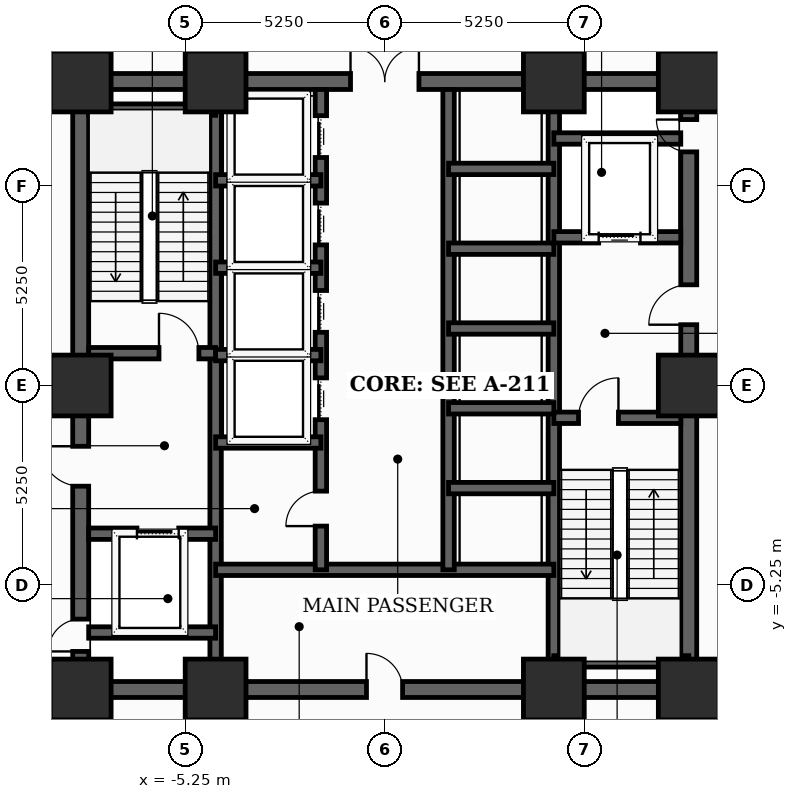
"""IFC4 building model, lengths in metres.
Left out: names, types, materials, properties, quantities, classifications, styles, units other than length and angle.
Written with IfcOpenShell. Run it as: python <this file> out.ifc"""

import sys

from ifc_helpers import new_model, si_unit, direction, frame, frame_2d, origin, origin_2d, place, context, subcontext, project, spatial, rectangle, extrude, element, fill, save


model = new_model("IFC4")
c1 = context("Model", 3, precision=1e-05, world=origin(), true_north=direction((0.0, 1.0)))
c2 = subcontext(c1, "Body", "Model", "MODEL_VIEW")
j1 = project(units=[si_unit("LENGTHUNIT", "METRE"), si_unit("PLANEANGLEUNIT", "RADIAN")], contexts=[c1])
p1 = place(None, origin())
s1 = spatial("IfcSite", under=j1, at=p1, CompositionType="ELEMENT")
p2 = place(p1, origin())
s2 = spatial("IfcBuilding", under=s1, at=p2, CompositionType="ELEMENT")
p3 = place(p2, frame((0.0, 0.0, -4.8)))
s3 = spatial("IfcBuildingStorey", under=s2, at=p3, CompositionType="ELEMENT", Elevation=-4.8)
for number, where, z_axis, x_axis in (
    (1, (-8.0, -8.0, 0.0), (0.0, 0.0, 1.0), (1.0, 0.0, 0.0)),
    (2, (-4.45, -8.0, 0.0), (0.0, 0.0, 1.0), (1.0, 0.0, 0.0)),
    (3, (4.45, -8.0, 0.0), (0.0, 0.0, 1.0), (1.0, 0.0, 0.0)),
    (4, (8.0, -8.0, 0.0), (0.0, 0.0, 1.0), (1.0, 0.0, 0.0)),
    (5, (8.0, 0.0, 0.0), (0.0, 0.0, 1.0), (1.0, 0.0, 0.0)),
    (6, (8.0, 8.0, 0.0), (0.0, 0.0, 1.0), (1.0, 0.0, 0.0)),
    (7, (4.45, 8.0, 0.0), (0.0, 0.0, 1.0), (1.0, 0.0, 0.0)),
    (8, (-4.45, 8.0, 0.0), (0.0, 0.0, 1.0), (1.0, 0.0, 0.0)),
    (9, (-8.0, 8.0, 0.0), (0.0, 0.0, 1.0), (1.0, 0.0, 0.0)),
    (10, (-8.0, 0.0, 0.0), (0.0, 0.0, 1.0), (1.0, 0.0, 0.0)),
):
    element("IfcColumn", number, at=place(p3, frame(where, z_axis=z_axis, x_axis=x_axis)), inside=s3, PredefinedType="COLUMN", context=c2, shape_type="SweptSolid", body=[
        extrude(rectangle(XDim=1.6, YDim=1.6, at=origin_2d()), origin(), (0.0, 0.0, 1.0), 4.8),
    ])
p4 = place(p3, frame((-8.0, -8.0, 0.0), z_axis=(0.0, 0.0, 1.0), x_axis=(0.0, 1.0, 0.0)))
e11 = element("IfcWall", 11, at=p4, inside=s3, PredefinedType="SHEAR", context=c2, shape_type="SweptSolid", body=[
    extrude(rectangle(XDim=16.0, YDim=0.42, at=frame_2d((8.0, 0.0))), origin(), (0.0, 0.0, 1.0), 4.55),
])
p5 = place(p4, frame((1.002, 0.0, 0.0)))
e12 = element("IfcOpeningElement", 12, at=p5, cuts=e11, PredefinedType="OPENING", context=c2, shape_type="SweptSolid", body=[
    extrude(rectangle(XDim=0.85, YDim=2.02, at=frame_2d((0.425, 1.01))), frame((0.0, 0.22, 0.0), z_axis=(0.0, -1.0, 0.0), x_axis=(1.0, 0.0, 0.0)), (0.0, 0.0, 1.0), 0.44),
])
p6 = place(p4, frame((5.35, 0.0, 0.0)))
e13 = element("IfcOpeningElement", 13, at=p6, cuts=e11, PredefinedType="OPENING", context=c2, shape_type="SweptSolid", body=[
    extrude(rectangle(XDim=1.05, YDim=2.15, at=frame_2d((0.525, 1.075))), frame((0.0, 0.22, 0.0), z_axis=(0.0, -1.0, 0.0), x_axis=(1.0, 0.0, 0.0)), (0.0, 0.0, 1.0), 0.44),
])
p7 = place(p3, frame((8.0, -8.0, 0.0), z_axis=(0.0, 0.0, 1.0), x_axis=(0.0, 1.0, 0.0)))
e14 = element("IfcWall", 14, at=p7, inside=s3, PredefinedType="SHEAR", context=c2, shape_type="SweptSolid", body=[
    extrude(rectangle(XDim=16.0, YDim=0.42, at=frame_2d((8.0, 0.0))), origin(), (0.0, 0.0, 1.0), 4.55),
])
p8 = place(p7, frame((9.6, 0.0, 0.0)))
e15 = element("IfcOpeningElement", 15, at=p8, cuts=e14, PredefinedType="OPENING", context=c2, shape_type="SweptSolid", body=[
    extrude(rectangle(XDim=1.05, YDim=2.15, at=frame_2d((0.525, 1.075))), frame((0.0, 0.22, 0.0), z_axis=(0.0, -1.0, 0.0), x_axis=(1.0, 0.0, 0.0)), (0.0, 0.0, 1.0), 0.44),
])
p9 = place(p7, frame((14.148, 0.0, 0.0)))
e16 = element("IfcOpeningElement", 16, at=p9, cuts=e14, PredefinedType="OPENING", context=c2, shape_type="SweptSolid", body=[
    extrude(rectangle(XDim=0.85, YDim=2.02, at=frame_2d((0.425, 1.01))), frame((0.0, 0.22, 0.0), z_axis=(0.0, -1.0, 0.0), x_axis=(1.0, 0.0, 0.0)), (0.0, 0.0, 1.0), 0.44),
])
p10 = place(p3, frame((-8.0, -8.0, 0.0), z_axis=(0.0, 0.0, 1.0), x_axis=(1.0, 0.0, 0.0)))
e17 = element("IfcWall", 17, at=p10, inside=s3, PredefinedType="SHEAR", context=c2, shape_type="SweptSolid", body=[
    extrude(rectangle(XDim=16.0, YDim=0.42, at=frame_2d((8.0, 0.0))), origin(), (0.0, 0.0, 1.0), 4.55),
])
p11 = place(p10, frame((7.52, 0.0, 0.0)))
e18 = element("IfcOpeningElement", 18, at=p11, cuts=e17, PredefinedType="OPENING", context=c2, shape_type="SweptSolid", body=[
    extrude(rectangle(XDim=0.95, YDim=2.1, at=frame_2d((0.475, 1.05))), frame((0.0, 0.22, 0.0), z_axis=(0.0, -1.0, 0.0), x_axis=(1.0, 0.0, 0.0)), (0.0, 0.0, 1.0), 0.44),
])
p12 = place(p3, frame((-8.0, 8.0, 0.0), z_axis=(0.0, 0.0, 1.0), x_axis=(1.0, 0.0, 0.0)))
e19 = element("IfcWall", 19, at=p12, inside=s3, PredefinedType="SHEAR", context=c2, shape_type="SweptSolid", body=[
    extrude(rectangle(XDim=16.0, YDim=0.42, at=frame_2d((8.0, 0.0))), origin(), (0.0, 0.0, 1.0), 4.55),
])
p13 = place(p12, frame((7.1, 0.0, 0.0)))
e20 = element("IfcOpeningElement", 20, at=p13, cuts=e19, PredefinedType="OPENING", context=c2, shape_type="SweptSolid", body=[
    extrude(rectangle(XDim=1.8, YDim=2.15, at=frame_2d((0.9, 1.075))), frame((0.0, 0.22, 0.0), z_axis=(0.0, -1.0, 0.0), x_axis=(1.0, 0.0, 0.0)), (0.0, 0.0, 1.0), 0.44),
])
for number, where, z_axis, x_axis in (
    (21, (-4.45, -7.79, 0.0), (0.0, 0.0, 1.0), (0.0, 1.0, 0.0)),
    (22, (4.45, -7.79, 0.0), (0.0, 0.0, 1.0), (0.0, 1.0, 0.0)),
):
    element("IfcWall", number, at=place(p3, frame(where, z_axis=z_axis, x_axis=x_axis)), inside=s3, PredefinedType="SHEAR", context=c2, shape_type="SweptSolid", body=[
        extrude(rectangle(XDim=15.58, YDim=0.3, at=frame_2d((7.79, 0.0))), origin(), (0.0, 0.0, 1.0), 4.55),
    ])
p14 = place(p3, frame((-7.79, 0.85, 0.0), z_axis=(0.0, 0.0, 1.0), x_axis=(1.0, 0.0, 0.0)))
e23 = element("IfcWall", 23, at=p14, inside=s3, PredefinedType="SHEAR", context=c2, shape_type="SweptSolid", body=[
    extrude(rectangle(XDim=3.34, YDim=0.3, at=frame_2d((1.67, 0.0))), origin(), (0.0, 0.0, 1.0), 4.55),
])
p15 = place(p14, frame((1.85, 0.0, 0.0)))
e24 = element("IfcOpeningElement", 24, at=p15, cuts=e23, PredefinedType="OPENING", context=c2, shape_type="SweptSolid", body=[
    extrude(rectangle(XDim=1.05, YDim=2.15, at=frame_2d((0.525, 1.075))), frame((0.0, 0.16, 0.0), z_axis=(0.0, -1.0, 0.0), x_axis=(1.0, 0.0, 0.0)), (0.0, 0.0, 1.0), 0.32),
])
p16 = place(p3, frame((-7.79, 7.26, 0.0), z_axis=(0.0, 0.0, 1.0), x_axis=(1.0, 0.0, 0.0)))
e25 = element("IfcWall", 25, at=p16, inside=s3, PredefinedType="SHEAR", context=c2, shape_type="SweptSolid", body=[
    extrude(rectangle(XDim=3.34, YDim=0.3, at=frame_2d((1.67, 0.0))), origin(), (0.0, 0.0, 1.0), 4.55),
])
p17 = place(p3, frame((4.45, -0.85, 0.0), z_axis=(0.0, 0.0, 1.0), x_axis=(1.0, 0.0, 0.0)))
e26 = element("IfcWall", 26, at=p17, inside=s3, PredefinedType="SHEAR", context=c2, shape_type="SweptSolid", body=[
    extrude(rectangle(XDim=3.34, YDim=0.3, at=frame_2d((1.67, 0.0))), origin(), (0.0, 0.0, 1.0), 4.55),
])
p18 = place(p17, frame((0.65, 0.0, 0.0)))
e27 = element("IfcOpeningElement", 27, at=p18, cuts=e26, PredefinedType="OPENING", context=c2, shape_type="SweptSolid", body=[
    extrude(rectangle(XDim=1.05, YDim=2.15, at=frame_2d((0.525, 1.075))), frame((0.0, 0.16, 0.0), z_axis=(0.0, -1.0, 0.0), x_axis=(1.0, 0.0, 0.0)), (0.0, 0.0, 1.0), 0.32),
])
p19 = place(p3, frame((4.45, -7.26, 0.0), z_axis=(0.0, 0.0, 1.0), x_axis=(1.0, 0.0, 0.0)))
e28 = element("IfcWall", 28, at=p19, inside=s3, PredefinedType="SHEAR", context=c2, shape_type="SweptSolid", body=[
    extrude(rectangle(XDim=3.55, YDim=0.3, at=frame_2d((1.775, 0.0))), origin(), (0.0, 0.0, 1.0), 4.55),
])
p20 = place(p3, frame((-7.79, -3.9, 0.0), z_axis=(0.0, 0.0, 1.0), x_axis=(1.0, 0.0, 0.0)))
e29 = element("IfcWall", 29, at=p20, inside=s3, PredefinedType="SHEAR", context=c2, shape_type="SweptSolid", body=[
    extrude(rectangle(XDim=3.34, YDim=0.3, at=frame_2d((1.67, 0.0))), origin(), (0.0, 0.0, 1.0), 4.55),
])
p21 = place(p20, frame((1.27, 0.0, 0.0)))
e30 = element("IfcOpeningElement", 30, at=p21, cuts=e29, PredefinedType="OPENING", context=c2, shape_type="SweptSolid", body=[
    extrude(rectangle(XDim=1.1, YDim=2.1, at=frame_2d((0.55, 1.05))), frame((0.0, 0.16, 0.0), z_axis=(0.0, -1.0, 0.0), x_axis=(1.0, 0.0, 0.0)), (0.0, 0.0, 1.0), 0.32),
])
p22 = place(p3, frame((-7.79, -6.5, 0.0), z_axis=(0.0, 0.0, 1.0), x_axis=(1.0, 0.0, 0.0)))
e31 = element("IfcWall", 31, at=p22, inside=s3, PredefinedType="SHEAR", context=c2, shape_type="SweptSolid", body=[
    extrude(rectangle(XDim=3.34, YDim=0.3, at=frame_2d((1.67, 0.0))), origin(), (0.0, 0.0, 1.0), 4.55),
])
p23 = place(p3, frame((4.45, 3.9, 0.0), z_axis=(0.0, 0.0, 1.0), x_axis=(1.0, 0.0, 0.0)))
e32 = element("IfcWall", 32, at=p23, inside=s3, PredefinedType="SHEAR", context=c2, shape_type="SweptSolid", body=[
    extrude(rectangle(XDim=3.34, YDim=0.3, at=frame_2d((1.67, 0.0))), origin(), (0.0, 0.0, 1.0), 4.55),
])
p24 = place(p23, frame((1.18, 0.0, 0.0)))
e33 = element("IfcOpeningElement", 33, at=p24, cuts=e32, PredefinedType="OPENING", context=c2, shape_type="SweptSolid", body=[
    extrude(rectangle(XDim=1.1, YDim=2.1, at=frame_2d((0.55, 1.05))), frame((0.0, 0.16, 0.0), z_axis=(0.0, -1.0, 0.0), x_axis=(1.0, 0.0, 0.0)), (0.0, 0.0, 1.0), 0.32),
])
p25 = place(p3, frame((4.45, 6.5, 0.0), z_axis=(0.0, 0.0, 1.0), x_axis=(1.0, 0.0, 0.0)))
e34 = element("IfcWall", 34, at=p25, inside=s3, PredefinedType="SHEAR", context=c2, shape_type="SweptSolid", body=[
    extrude(rectangle(XDim=3.34, YDim=0.3, at=frame_2d((1.67, 0.0))), origin(), (0.0, 0.0, 1.0), 4.55),
])
p26 = place(p3, frame((-4.45, -4.85, 0.0), z_axis=(0.0, 0.0, 1.0), x_axis=(1.0, 0.0, 0.0)))
e35 = element("IfcWall", 35, at=p26, inside=s3, PredefinedType="SHEAR", context=c2, shape_type="SweptSolid", body=[
    extrude(rectangle(XDim=8.9, YDim=0.3, at=frame_2d((4.45, 0.0))), origin(), (0.0, 0.0, 1.0), 4.55),
])
p27 = place(p3, frame((-1.68, -4.85, 0.0), z_axis=(0.0, 0.0, 1.0), x_axis=(0.0, 1.0, 0.0)))
e36 = element("IfcWall", 36, at=p27, inside=s3, PredefinedType="SHEAR", context=c2, shape_type="SweptSolid", body=[
    extrude(rectangle(XDim=12.64, YDim=0.3, at=frame_2d((6.32, 0.0))), origin(), (0.0, 0.0, 1.0), 4.55),
])
p28 = place(p27, frame((3.95, 0.0, 0.0)))
e37 = element("IfcOpeningElement", 37, at=p28, cuts=e36, PredefinedType="OPENING", context=c2, shape_type="SweptSolid", body=[
    extrude(rectangle(XDim=1.1, YDim=2.1, at=frame_2d((0.55, 1.05))), frame((0.0, 0.16, 0.0), z_axis=(0.0, -1.0, 0.0), x_axis=(1.0, 0.0, 0.0)), (0.0, 0.0, 1.0), 0.32),
])
p29 = place(p27, frame((6.25, 0.0, 0.0)))
e38 = element("IfcOpeningElement", 38, at=p29, cuts=e36, PredefinedType="OPENING", context=c2, shape_type="SweptSolid", body=[
    extrude(rectangle(XDim=1.1, YDim=2.1, at=frame_2d((0.55, 1.05))), frame((0.0, 0.16, 0.0), z_axis=(0.0, -1.0, 0.0), x_axis=(1.0, 0.0, 0.0)), (0.0, 0.0, 1.0), 0.32),
])
p30 = place(p27, frame((8.55, 0.0, 0.0)))
e39 = element("IfcOpeningElement", 39, at=p30, cuts=e36, PredefinedType="OPENING", context=c2, shape_type="SweptSolid", body=[
    extrude(rectangle(XDim=1.1, YDim=2.1, at=frame_2d((0.55, 1.05))), frame((0.0, 0.16, 0.0), z_axis=(0.0, -1.0, 0.0), x_axis=(1.0, 0.0, 0.0)), (0.0, 0.0, 1.0), 0.32),
])
p31 = place(p27, frame((10.85, 0.0, 0.0)))
e40 = element("IfcOpeningElement", 40, at=p31, cuts=e36, PredefinedType="OPENING", context=c2, shape_type="SweptSolid", body=[
    extrude(rectangle(XDim=1.1, YDim=2.1, at=frame_2d((0.55, 1.05))), frame((0.0, 0.16, 0.0), z_axis=(0.0, -1.0, 0.0), x_axis=(1.0, 0.0, 0.0)), (0.0, 0.0, 1.0), 0.32),
])
p32 = place(p27, frame((1.15, 0.0, 0.0)))
e41 = element("IfcOpeningElement", 41, at=p32, cuts=e36, PredefinedType="OPENING", context=c2, shape_type="SweptSolid", body=[
    extrude(rectangle(XDim=0.92, YDim=2.1, at=frame_2d((0.46, 1.05))), frame((0.0, 0.16, 0.0), z_axis=(0.0, -1.0, 0.0), x_axis=(1.0, 0.0, 0.0)), (0.0, 0.0, 1.0), 0.32),
])
p33 = place(p3, frame((1.68, -4.85, 0.0), z_axis=(0.0, 0.0, 1.0), x_axis=(0.0, 1.0, 0.0)))
e42 = element("IfcWall", 42, at=p33, inside=s3, PredefinedType="SHEAR", context=c2, shape_type="SweptSolid", body=[
    extrude(rectangle(XDim=12.64, YDim=0.3, at=frame_2d((6.32, 0.0))), origin(), (0.0, 0.0, 1.0), 4.55),
])
for number, where, z_axis, x_axis in (
    (43, (-4.45, -1.5, 0.0), (0.0, 0.0, 1.0), (1.0, 0.0, 0.0)),
    (44, (-4.45, 0.8, 0.0), (0.0, 0.0, 1.0), (1.0, 0.0, 0.0)),
    (45, (-4.45, 3.1, 0.0), (0.0, 0.0, 1.0), (1.0, 0.0, 0.0)),
    (46, (-4.45, 5.4, 0.0), (0.0, 0.0, 1.0), (1.0, 0.0, 0.0)),
    (47, (1.68, 1.5, 0.0), (0.0, 0.0, 1.0), (1.0, 0.0, 0.0)),
    (48, (1.68, 3.6, 0.0), (0.0, 0.0, 1.0), (1.0, 0.0, 0.0)),
    (49, (1.68, 5.7, 0.0), (0.0, 0.0, 1.0), (1.0, 0.0, 0.0)),
    (50, (1.68, -2.7, 0.0), (0.0, 0.0, 1.0), (1.0, 0.0, 0.0)),
    (51, (1.68, -0.6, 0.0), (0.0, 0.0, 1.0), (1.0, 0.0, 0.0)),
):
    element("IfcWall", number, at=place(p3, frame(where, z_axis=z_axis, x_axis=x_axis)), inside=s3, PredefinedType="SHEAR", context=c2, shape_type="SweptSolid", body=[
        extrude(rectangle(XDim=2.77, YDim=0.3, at=frame_2d((1.385, 0.0))), origin(), (0.0, 0.0, 1.0), 4.55),
    ])
p34 = place(p5, origin())
e52 = element("IfcDoor", 52, at=p34, inside=s3, OperationType="SINGLE_SWING_LEFT", PredefinedType="TRAPDOOR", context=c2, shape_type="SweptSolid", body=[
    extrude(rectangle(XDim=0.85, YDim=2.02, at=frame_2d((0.425, 1.01))), frame((0.0, 0.025, 0.0), z_axis=(0.0, -1.0, 0.0), x_axis=(1.0, 0.0, 0.0)), (0.0, 0.0, 1.0), 0.05),
])
fill(e12, e52)
p35 = place(p6, origin())
e53 = element("IfcDoor", 53, at=p35, inside=s3, OperationType="SINGLE_SWING_RIGHT", PredefinedType="DOOR", context=c2, shape_type="SweptSolid", body=[
    extrude(rectangle(XDim=1.05, YDim=2.15, at=frame_2d((0.525, 1.075))), frame((0.0, 0.025, 0.0), z_axis=(0.0, -1.0, 0.0), x_axis=(1.0, 0.0, 0.0)), (0.0, 0.0, 1.0), 0.05),
])
fill(e13, e53)
p36 = place(p8, origin())
e54 = element("IfcDoor", 54, at=p36, inside=s3, OperationType="SINGLE_SWING_LEFT", PredefinedType="DOOR", context=c2, shape_type="SweptSolid", body=[
    extrude(rectangle(XDim=1.05, YDim=2.15, at=frame_2d((0.525, 1.075))), frame((0.0, 0.025, 0.0), z_axis=(0.0, -1.0, 0.0), x_axis=(1.0, 0.0, 0.0)), (0.0, 0.0, 1.0), 0.05),
])
fill(e15, e54)
p37 = place(p9, origin())
e55 = element("IfcDoor", 55, at=p37, inside=s3, OperationType="SINGLE_SWING_RIGHT", PredefinedType="TRAPDOOR", context=c2, shape_type="SweptSolid", body=[
    extrude(rectangle(XDim=0.85, YDim=2.02, at=frame_2d((0.425, 1.01))), frame((0.0, 0.025, 0.0), z_axis=(0.0, -1.0, 0.0), x_axis=(1.0, 0.0, 0.0)), (0.0, 0.0, 1.0), 0.05),
])
fill(e16, e55)
p38 = place(p11, origin())
e56 = element("IfcDoor", 56, at=p38, inside=s3, OperationType="SINGLE_SWING_LEFT", PredefinedType="DOOR", context=c2, shape_type="SweptSolid", body=[
    extrude(rectangle(XDim=0.95, YDim=2.1, at=frame_2d((0.475, 1.05))), frame((0.0, 0.025, 0.0), z_axis=(0.0, -1.0, 0.0), x_axis=(1.0, 0.0, 0.0)), (0.0, 0.0, 1.0), 0.05),
])
fill(e18, e56)
p39 = place(p13, origin())
e57 = element("IfcDoor", 57, at=p39, inside=s3, OperationType="DOUBLE_DOOR_SINGLE_SWING", PredefinedType="DOOR", context=c2, shape_type="SweptSolid", body=[
    extrude(rectangle(XDim=1.8, YDim=2.15, at=frame_2d((0.9, 1.075))), frame((0.0, 0.025, 0.0), z_axis=(0.0, -1.0, 0.0), x_axis=(1.0, 0.0, 0.0)), (0.0, 0.0, 1.0), 0.05),
])
fill(e20, e57)
p40 = place(p15, origin())
e58 = element("IfcDoor", 58, at=p40, inside=s3, OperationType="SINGLE_SWING_LEFT", PredefinedType="DOOR", context=c2, shape_type="SweptSolid", body=[
    extrude(rectangle(XDim=1.05, YDim=2.15, at=frame_2d((0.525, 1.075))), frame((0.0, 0.025, 0.0), z_axis=(0.0, -1.0, 0.0), x_axis=(1.0, 0.0, 0.0)), (0.0, 0.0, 1.0), 0.05),
])
fill(e24, e58)
p41 = place(p18, origin())
e59 = element("IfcDoor", 59, at=p41, inside=s3, OperationType="SINGLE_SWING_RIGHT", PredefinedType="DOOR", context=c2, shape_type="SweptSolid", body=[
    extrude(rectangle(XDim=1.05, YDim=2.15, at=frame_2d((0.525, 1.075))), frame((0.0, 0.025, 0.0), z_axis=(0.0, -1.0, 0.0), x_axis=(1.0, 0.0, 0.0)), (0.0, 0.0, 1.0), 0.05),
])
fill(e27, e59)
p42 = place(p21, origin())
e60 = element("IfcDoor", 60, at=p42, inside=s3, OperationType="SLIDING_TO_LEFT", PredefinedType="DOOR", context=c2, shape_type="SweptSolid", body=[
    extrude(rectangle(XDim=1.1, YDim=2.1, at=frame_2d((0.55, 1.05))), frame((0.0, 0.025, 0.0), z_axis=(0.0, -1.0, 0.0), x_axis=(1.0, 0.0, 0.0)), (0.0, 0.0, 1.0), 0.05),
])
fill(e30, e60)
p43 = place(p24, origin())
e61 = element("IfcDoor", 61, at=p43, inside=s3, OperationType="SLIDING_TO_LEFT", PredefinedType="DOOR", context=c2, shape_type="SweptSolid", body=[
    extrude(rectangle(XDim=1.1, YDim=2.1, at=frame_2d((0.55, 1.05))), frame((0.0, 0.025, 0.0), z_axis=(0.0, -1.0, 0.0), x_axis=(1.0, 0.0, 0.0)), (0.0, 0.0, 1.0), 0.05),
])
fill(e33, e61)
p44 = place(p28, origin())
e62 = element("IfcDoor", 62, at=p44, inside=s3, OperationType="SLIDING_TO_LEFT", PredefinedType="DOOR", context=c2, shape_type="SweptSolid", body=[
    extrude(rectangle(XDim=1.1, YDim=2.1, at=frame_2d((0.55, 1.05))), frame((0.0, 0.025, 0.0), z_axis=(0.0, -1.0, 0.0), x_axis=(1.0, 0.0, 0.0)), (0.0, 0.0, 1.0), 0.05),
])
fill(e37, e62)
p45 = place(p29, origin())
e63 = element("IfcDoor", 63, at=p45, inside=s3, OperationType="SLIDING_TO_LEFT", PredefinedType="DOOR", context=c2, shape_type="SweptSolid", body=[
    extrude(rectangle(XDim=1.1, YDim=2.1, at=frame_2d((0.55, 1.05))), frame((0.0, 0.025, 0.0), z_axis=(0.0, -1.0, 0.0), x_axis=(1.0, 0.0, 0.0)), (0.0, 0.0, 1.0), 0.05),
])
fill(e38, e63)
p46 = place(p30, origin())
e64 = element("IfcDoor", 64, at=p46, inside=s3, OperationType="SLIDING_TO_LEFT", PredefinedType="DOOR", context=c2, shape_type="SweptSolid", body=[
    extrude(rectangle(XDim=1.1, YDim=2.1, at=frame_2d((0.55, 1.05))), frame((0.0, 0.025, 0.0), z_axis=(0.0, -1.0, 0.0), x_axis=(1.0, 0.0, 0.0)), (0.0, 0.0, 1.0), 0.05),
])
fill(e39, e64)
p47 = place(p31, origin())
e65 = element("IfcDoor", 65, at=p47, inside=s3, OperationType="SLIDING_TO_LEFT", PredefinedType="DOOR", context=c2, shape_type="SweptSolid", body=[
    extrude(rectangle(XDim=1.1, YDim=2.1, at=frame_2d((0.55, 1.05))), frame((0.0, 0.025, 0.0), z_axis=(0.0, -1.0, 0.0), x_axis=(1.0, 0.0, 0.0)), (0.0, 0.0, 1.0), 0.05),
])
fill(e40, e65)
p48 = place(p32, origin())
e66 = element("IfcDoor", 66, at=p48, inside=s3, OperationType="SINGLE_SWING_LEFT", PredefinedType="DOOR", context=c2, shape_type="SweptSolid", body=[
    extrude(rectangle(XDim=0.92, YDim=2.1, at=frame_2d((0.46, 1.05))), frame((0.0, 0.025, 0.0), z_axis=(0.0, -1.0, 0.0), x_axis=(1.0, 0.0, 0.0)), (0.0, 0.0, 1.0), 0.05),
])
fill(e41, e66)
save(model, sys.argv[1])
